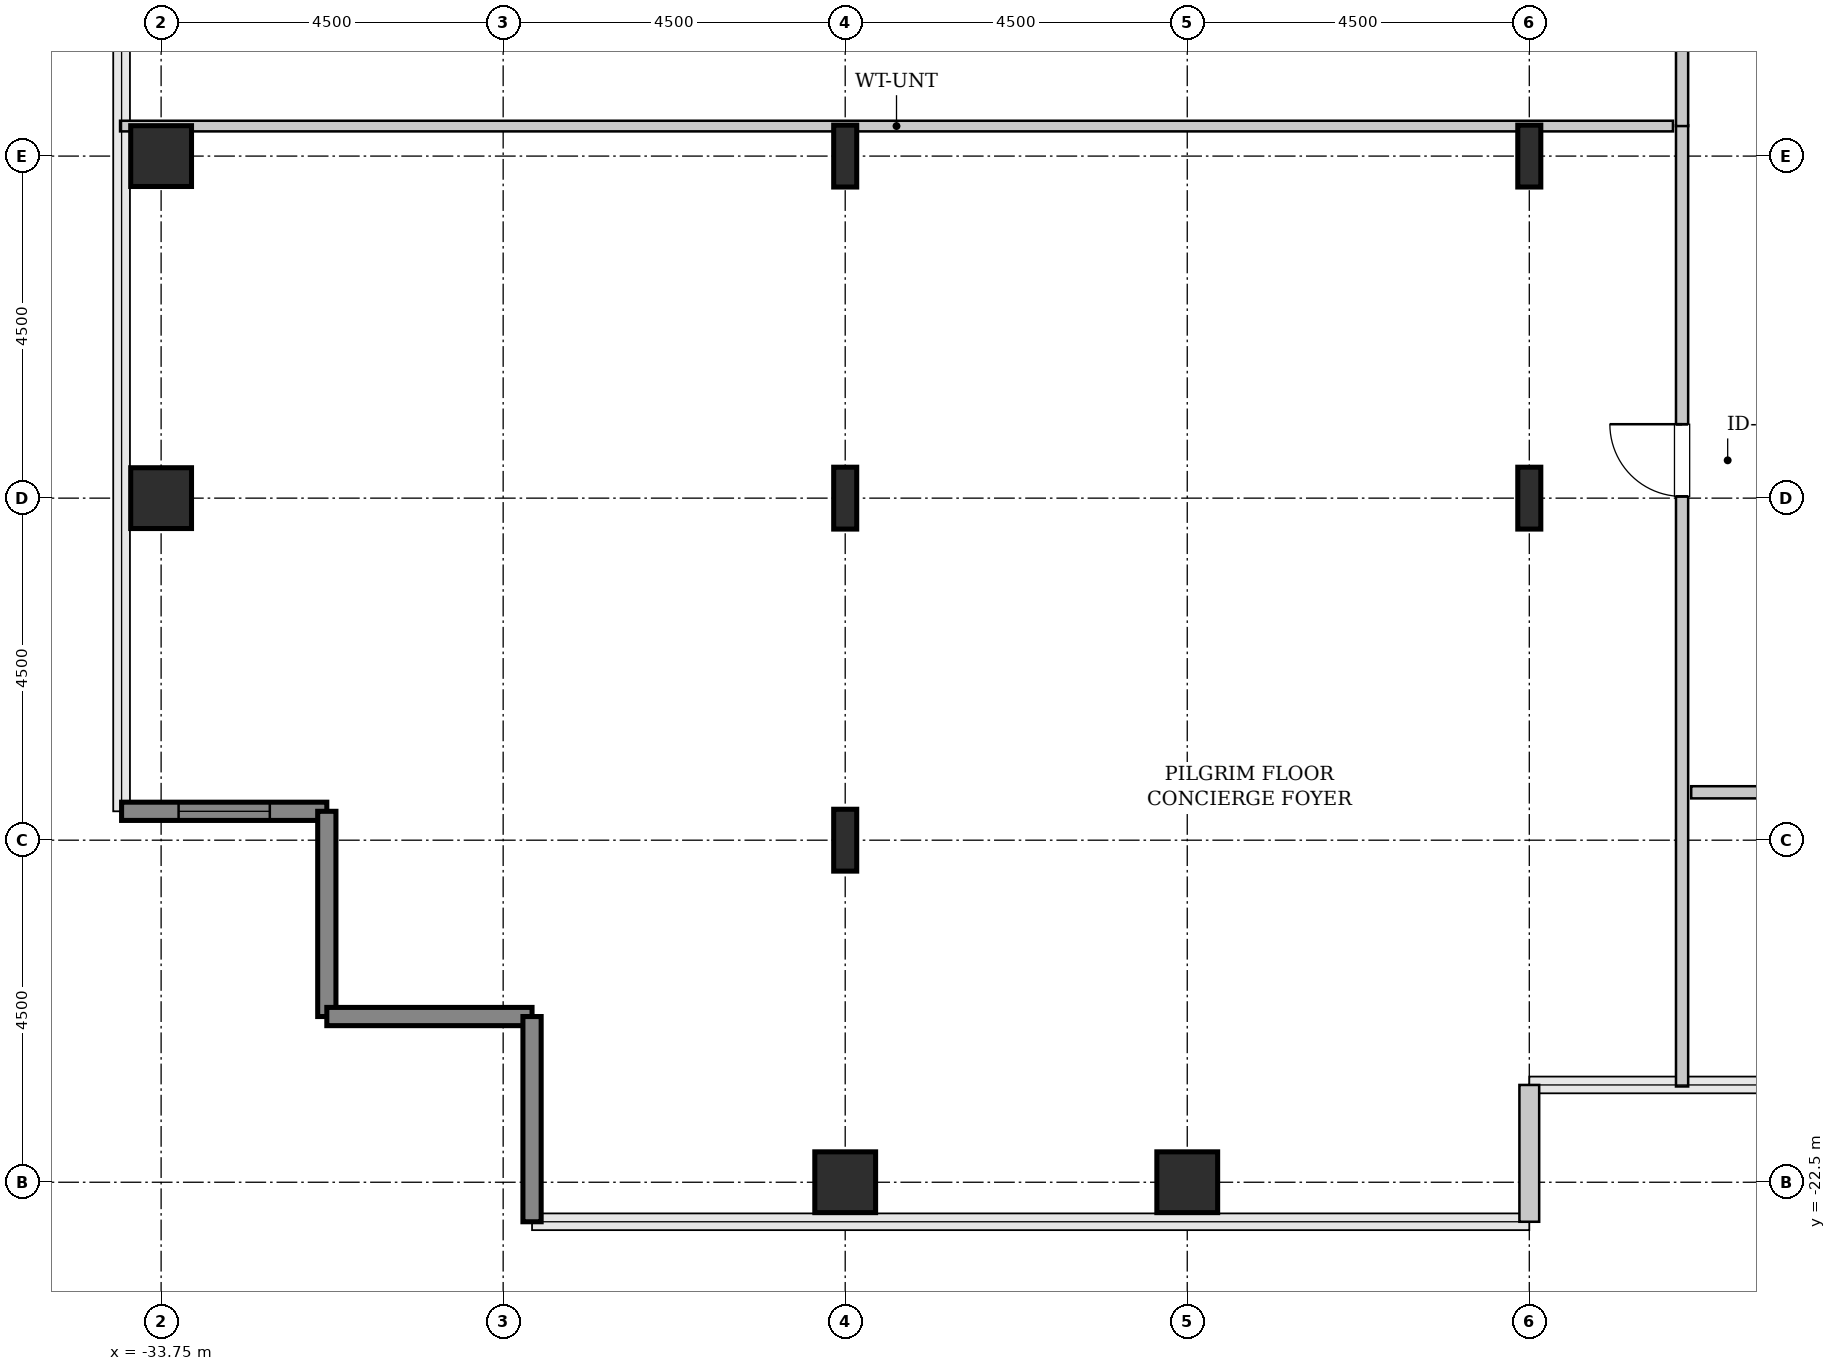
"""IFC4 building model, lengths in metres.
Left out: names, types, materials, properties, quantities, classifications, styles, units other than length and angle.
Written with IfcOpenShell. Run it as: python <this file> out.ifc"""

import sys

from ifc_helpers import new_model, si_unit, direction, frame, frame_2d, origin, origin_2d, place, context, subcontext, project, spatial, rectangle, hollow_rectangle, i_section, extrude, source, transform, mapped, element, fill, save


model = new_model("IFC4")
c1 = context("Model", 3, precision=1e-05, world=origin(), true_north=direction((0.0, 1.0)))
c2 = subcontext(c1, "Body", "Model", "MODEL_VIEW")
j1 = project(units=[si_unit("LENGTHUNIT", "METRE"), si_unit("PLANEANGLEUNIT", "RADIAN")], contexts=[c1])
p1 = place(None, origin())
s1 = spatial("IfcSite", under=j1, at=p1, CompositionType="ELEMENT")
p2 = place(p1, origin())
s2 = spatial("IfcBuilding", under=s1, at=p2, CompositionType="ELEMENT")
p3 = place(p2, frame((0.0, 0.0, 186.8)))
s3 = spatial("IfcBuildingStorey", under=s2, at=p3, CompositionType="ELEMENT", Elevation=186.8)
m1 = source(origin(), c2, "Body", "SweptSolid", [
    extrude(hollow_rectangle(XDim=0.8, YDim=0.8, WallThickness=0.04, InnerFilletRadius=0.04, OuterFilletRadius=0.08, at=origin_2d()), origin(), (0.0, 0.0, 1.0), 3.8),
])
for number, where, z_axis, x_axis in (
    (1, (-33.75, -13.5, 0.0), (0.0, 0.0, 1.0), (1.0, 0.0, 0.0)),
    (2, (-33.75, -9.0, 0.0), (0.0, 0.0, 1.0), (1.0, 0.0, 0.0)),
    (3, (-24.75, -22.5, 0.0), (0.0, 0.0, 1.0), (1.0, 0.0, 0.0)),
):
    element("IfcColumn", number, at=place(p3, frame(where, z_axis=z_axis, x_axis=x_axis)), inside=s3, PredefinedType="COLUMN", context=c2, shape_type="MappedRepresentation", body=[
        mapped(m1, transform((0.0, 0.0, 0.0), x_axis=(1.0, 0.0, 0.0), y_axis=(0.0, 1.0, 0.0), z_axis=(0.0, 0.0, 1.0), scale=1.0)),
    ])
m2 = source(origin(), c2, "Body", "SweptSolid", [
    extrude(i_section(OverallWidth=0.303, OverallDepth=0.814, WebThickness=0.021, FlangeThickness=0.04, FilletRadius=0.03, at=origin_2d()), origin(), (0.0, 0.0, 1.0), 3.8),
])
for number, where, z_axis, x_axis in (
    (4, (-24.75, -18.0, 0.0), (0.0, 0.0, 1.0), (1.0, 0.0, 0.0)),
    (5, (-24.75, -13.5, 0.0), (0.0, 0.0, 1.0), (1.0, 0.0, 0.0)),
    (6, (-24.75, -9.0, 0.0), (0.0, 0.0, 1.0), (1.0, 0.0, 0.0)),
):
    element("IfcColumn", number, at=place(p3, frame(where, z_axis=z_axis, x_axis=x_axis)), inside=s3, PredefinedType="COLUMN", context=c2, shape_type="MappedRepresentation", body=[
        mapped(m2, transform((0.0, 0.0, 0.0), x_axis=(1.0, 0.0, 0.0), y_axis=(0.0, 1.0, 0.0), z_axis=(0.0, 0.0, 1.0), scale=1.0)),
    ])
p4 = place(p3, frame((-20.25, -22.5, 0.0), z_axis=(0.0, 0.0, 1.0), x_axis=(1.0, 0.0, 0.0)))
e7 = element("IfcColumn", 7, at=p4, inside=s3, PredefinedType="COLUMN", context=c2, shape_type="MappedRepresentation", body=[
    mapped(m1, transform((0.0, 0.0, 0.0), x_axis=(1.0, 0.0, 0.0), y_axis=(0.0, 1.0, 0.0), z_axis=(0.0, 0.0, 1.0), scale=1.0)),
])
for number, where, z_axis, x_axis in (
    (8, (-15.75, -13.5, 0.0), (0.0, 0.0, 1.0), (1.0, 0.0, 0.0)),
    (9, (-15.75, -9.0, 0.0), (0.0, 0.0, 1.0), (1.0, 0.0, 0.0)),
):
    element("IfcColumn", number, at=place(p3, frame(where, z_axis=z_axis, x_axis=x_axis)), inside=s3, PredefinedType="COLUMN", context=c2, shape_type="MappedRepresentation", body=[
        mapped(m2, transform((0.0, 0.0, 0.0), x_axis=(1.0, 0.0, 0.0), y_axis=(0.0, 1.0, 0.0), z_axis=(0.0, 0.0, 1.0), scale=1.0)),
    ])
m3 = source(origin(), c2, "Body", "SweptSolid", [
    extrude(rectangle(XDim=2.7, YDim=0.24, at=frame_2d((1.35, 0.0))), origin(), (0.0, 0.0, 1.0), 3.55),
])
p5 = place(p3, frame((-34.27, -17.62, 0.0), z_axis=(0.0, 0.0, 1.0), x_axis=(1.0, 0.0, 0.0)))
e10 = element("IfcWall", 10, at=p5, inside=s3, PredefinedType="SHEAR", context=c2, shape_type="MappedRepresentation", body=[
    mapped(m3, transform((0.0, 0.0, 0.0), x_axis=(1.0, 0.0, 0.0), y_axis=(0.0, 1.0, 0.0), z_axis=(0.0, 0.0, 1.0), scale=1.0)),
])
p6 = place(p5, frame((0.75, 0.0, 0.85)))
e11 = element("IfcOpeningElement", 11, at=p6, cuts=e10, PredefinedType="OPENING", context=c2, shape_type="SweptSolid", body=[
    extrude(rectangle(XDim=1.2, YDim=1.8, at=frame_2d((0.6, 0.9))), frame((0.0, 0.13, 0.0), z_axis=(0.0, -1.0, 0.0), x_axis=(1.0, 0.0, 0.0)), (0.0, 0.0, 1.0), 0.26),
])
for number, where, z_axis, x_axis in (
    (12, (-31.57, -17.62, 0.0), (0.0, 0.0, 1.0), (0.0, -1.0, 0.0)),
    (13, (-31.57, -20.32, 0.0), (0.0, 0.0, 1.0), (1.0, 0.0, 0.0)),
    (14, (-28.87, -20.32, 0.0), (0.0, 0.0, 1.0), (0.0, -1.0, 0.0)),
):
    element("IfcWall", number, at=place(p3, frame(where, z_axis=z_axis, x_axis=x_axis)), inside=s3, PredefinedType="SHEAR", context=c2, shape_type="MappedRepresentation", body=[
        mapped(m3, transform((0.0, 0.0, 0.0), x_axis=(1.0, 0.0, 0.0), y_axis=(0.0, 1.0, 0.0), z_axis=(0.0, 0.0, 1.0), scale=1.0)),
    ])
m4 = source(origin(), c2, "Body", "SweptSolid", [
    extrude(rectangle(XDim=1.8, YDim=0.26, at=frame_2d((0.9, 0.0))), origin(), (0.0, 0.0, 1.0), 3.55),
])
p7 = place(p3, frame((-15.75, -23.02, 0.0), z_axis=(0.0, 0.0, 1.0), x_axis=(0.0, 1.0, 0.0)))
e15 = element("IfcWall", 15, at=p7, inside=s3, PredefinedType="SOLIDWALL", context=c2, shape_type="MappedRepresentation", body=[
    mapped(m4, transform((0.0, 0.0, 0.0), x_axis=(1.0, 0.0, 0.0), y_axis=(0.0, 1.0, 0.0), z_axis=(0.0, 0.0, 1.0), scale=1.0)),
])
m5 = source(origin(), c2, "Body", "SweptSolid", [
    extrude(rectangle(XDim=12.645, YDim=0.16, at=frame_2d((6.323, 0.0))), origin(), (0.0, 0.0, 1.0), 3.535),
])
p8 = place(p3, frame((-13.74, -21.24, 0.0), z_axis=(0.0, 0.0, 1.0), x_axis=(0.0, 1.0, 0.0)))
e16 = element("IfcWall", 16, at=p8, inside=s3, PredefinedType="PARTITIONING", context=c2, shape_type="MappedRepresentation", body=[
    mapped(m5, transform((0.0, 0.0, 0.0), x_axis=(1.0, 0.0, 0.0), y_axis=(0.0, 1.0, 0.0), z_axis=(0.0, 0.0, 1.0), scale=1.0)),
])
p9 = place(p8, frame((7.762, 0.0, 0.0)))
e17 = element("IfcOpeningElement", 17, at=p9, cuts=e16, PredefinedType="OPENING", context=c2, shape_type="SweptSolid", body=[
    extrude(rectangle(XDim=0.95, YDim=2.1, at=frame_2d((0.475, 1.05))), frame((0.0, 0.09, 0.0), z_axis=(0.0, -1.0, 0.0), x_axis=(1.0, 0.0, 0.0)), (0.0, 0.0, 1.0), 0.18),
])
m6 = source(origin(), c2, "Body", "SweptSolid", [
    extrude(rectangle(XDim=20.43, YDim=0.14, at=frame_2d((10.215, 0.0))), origin(), (0.0, 0.0, 1.0), 2.875),
])
p10 = place(p3, frame((-34.29, -8.605, 0.0), z_axis=(0.0, 0.0, 1.0), x_axis=(1.0, 0.0, 0.0)))
e18 = element("IfcWall", 18, at=p10, inside=s3, PredefinedType="PARTITIONING", context=c2, shape_type="MappedRepresentation", body=[
    mapped(m6, transform((0.0, 0.0, 0.0), x_axis=(1.0, 0.0, 0.0), y_axis=(0.0, 1.0, 0.0), z_axis=(0.0, 0.0, 1.0), scale=1.0)),
])
m7 = source(origin(), c2, "Body", "SweptSolid", [
    extrude(rectangle(XDim=3.21, YDim=0.16, at=frame_2d((1.605, 0.0))), origin(), (0.0, 0.0, 1.0), 3.535),
])
p11 = place(p3, frame((-13.74, -8.605, 0.0), z_axis=(0.0, 0.0, 1.0), x_axis=(0.0, 1.0, 0.0)))
e19 = element("IfcWall", 19, at=p11, inside=s3, PredefinedType="PARTITIONING", context=c2, shape_type="MappedRepresentation", body=[
    mapped(m7, transform((0.0, 0.0, 0.0), x_axis=(1.0, 0.0, 0.0), y_axis=(0.0, 1.0, 0.0), z_axis=(0.0, 0.0, 1.0), scale=1.0)),
])
p12 = place(p11, frame((1.13, 0.0, 0.0)))
e20 = element("IfcOpeningElement", 20, at=p12, cuts=e19, PredefinedType="OPENING", context=c2, shape_type="SweptSolid", body=[
    extrude(rectangle(XDim=0.95, YDim=2.1, at=frame_2d((0.475, 1.05))), frame((0.0, 0.09, 0.0), z_axis=(0.0, -1.0, 0.0), x_axis=(1.0, 0.0, 0.0)), (0.0, 0.0, 1.0), 0.18),
])
m8 = source(origin(), c2, "Body", "SweptSolid", [
    extrude(rectangle(XDim=7.225, YDim=0.16, at=frame_2d((3.613, 0.0))), origin(), (0.0, 0.0, 1.0), 3.535),
])
p13 = place(p3, frame((-13.62, -17.37, 0.0), z_axis=(0.0, 0.0, 1.0), x_axis=(1.0, 0.0, 0.0)))
e21 = element("IfcWall", 21, at=p13, inside=s3, PredefinedType="PARTITIONING", context=c2, shape_type="MappedRepresentation", body=[
    mapped(m8, transform((0.0, 0.0, 0.0), x_axis=(1.0, 0.0, 0.0), y_axis=(0.0, 1.0, 0.0), z_axis=(0.0, 0.0, 1.0), scale=1.0)),
])
p14 = place(p13, frame((3.137, 0.0, 0.0)))
e22 = element("IfcOpeningElement", 22, at=p14, cuts=e21, PredefinedType="OPENING", context=c2, shape_type="SweptSolid", body=[
    extrude(rectangle(XDim=0.95, YDim=2.1, at=frame_2d((0.475, 1.05))), frame((0.0, 0.09, 0.0), z_axis=(0.0, -1.0, 0.0), x_axis=(1.0, 0.0, 0.0)), (0.0, 0.0, 1.0), 0.18),
])
m9 = source(origin(), c2, "Body", "SweptSolid", [
    extrude(rectangle(XDim=1.2, YDim=1.8, at=frame_2d((0.6, 0.9))), frame((0.0, 0.03, 0.0), z_axis=(0.0, -1.0, 0.0), x_axis=(1.0, 0.0, 0.0)), (0.0, 0.0, 1.0), 0.06),
])
p15 = place(p6, origin())
e23 = element("IfcWindow", 23, at=p15, inside=s3, PartitioningType="SINGLE_PANEL", PredefinedType="WINDOW", context=c2, shape_type="MappedRepresentation", body=[
    mapped(m9, transform((0.0, 0.0, 0.0), x_axis=(1.0, 0.0, 0.0), y_axis=(0.0, 1.0, 0.0), z_axis=(0.0, 0.0, 1.0), scale=1.0)),
])
fill(e11, e23)
m10 = source(origin(), c2, "Body", "SweptSolid", [
    extrude(rectangle(XDim=0.95, YDim=2.1, at=frame_2d((0.475, 1.05))), frame((0.0, 0.025, 0.0), z_axis=(0.0, -1.0, 0.0), x_axis=(1.0, 0.0, 0.0)), (0.0, 0.0, 1.0), 0.05),
])
p16 = place(p9, origin())
e24 = element("IfcDoor", 24, at=p16, inside=s3, OperationType="SINGLE_SWING_RIGHT", PredefinedType="DOOR", context=c2, shape_type="MappedRepresentation", body=[
    mapped(m10, transform((0.0, 0.0, 0.0), x_axis=(1.0, 0.0, 0.0), y_axis=(0.0, 1.0, 0.0), z_axis=(0.0, 0.0, 1.0), scale=1.0)),
])
fill(e17, e24)
save(model, sys.argv[1])
